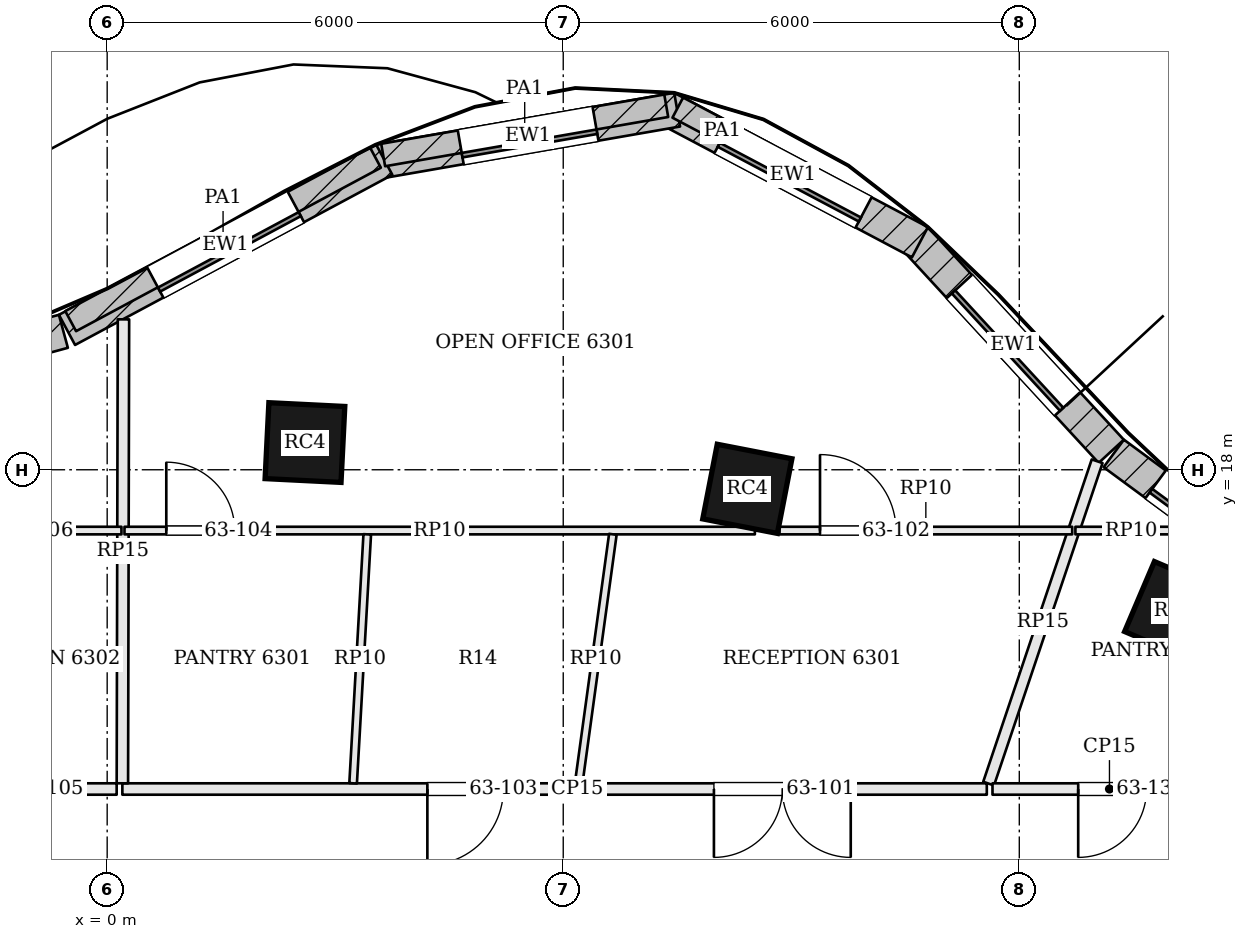
"""IFC4 building model, lengths in metres.
Left out: names, types, materials, properties, quantities, classifications, styles, units other than length and angle.
Written with IfcOpenShell. Run it as: python <this file> out.ifc"""

import sys

from ifc_helpers import new_model, si_unit, direction, frame, frame_2d, origin, origin_2d, place, context, subcontext, project, spatial, rectangle, extrude, element, fill, save


model = new_model("IFC4")
c1 = context("Model", 3, precision=1e-05, world=origin(), true_north=direction((0.0, 1.0)))
c2 = subcontext(c1, "Body", "Model", "MODEL_VIEW")
j1 = project(units=[si_unit("LENGTHUNIT", "METRE"), si_unit("PLANEANGLEUNIT", "RADIAN")], contexts=[c1])
p1 = place(None, origin())
s1 = spatial("IfcSite", under=j1, at=p1, CompositionType="ELEMENT")
p2 = place(p1, origin())
s2 = spatial("IfcBuilding", under=s1, at=p2, CompositionType="ELEMENT")
p3 = place(p2, frame((0.0, 0.0, 256.5)))
s3 = spatial("IfcBuildingStorey", under=s2, at=p3, CompositionType="ELEMENT", Elevation=256.5)
for number, where, z_axis, x_axis in (
    (1, (14.042, 16.136, 0.0), (0.0, 0.0, 1.0), (-0.92, 0.392, 0.0)),
    (2, (8.422, 17.749, 0.0), (0.0, 0.0, 1.0), (-0.982, 0.191, 0.0)),
    (3, (2.602, 18.358, 0.0), (0.0, 0.0, 1.0), (-0.999, 0.05, 0.0)),
):
    element("IfcColumn", number, at=place(p3, frame(where, z_axis=z_axis, x_axis=x_axis)), inside=s3, PredefinedType="COLUMN", context=c2, shape_type="SweptSolid", body=[
        extrude(rectangle(XDim=1.0, YDim=1.0, at=origin_2d()), origin(), (0.0, 0.0, 1.0), 3.9),
    ])
p4 = place(p3, frame((16.036, 16.158, 0.0), z_axis=(0.0, 0.0, 1.0), x_axis=(-0.805181432967, 0.593028549064, 0.0)))
e4 = element("IfcWall", 4, at=p4, inside=s3, PredefinedType="SOLIDWALL", context=c2, shape_type="SweptSolid", body=[
    extrude(rectangle(XDim=3.469, YDim=0.45, at=frame_2d((1.734, 0.0))), origin(), (0.0, 0.0, 1.0), 3.7),
])
p5 = place(p4, frame((0.684, 0.0, 0.9)))
e5 = element("IfcOpeningElement", 5, at=p5, cuts=e4, PredefinedType="OPENING", context=c2, shape_type="SweptSolid", body=[
    extrude(rectangle(XDim=2.1, YDim=2.3, at=frame_2d((1.05, 1.15))), frame((0.0, 0.235, 0.0), z_axis=(0.0, -1.0, 0.0), x_axis=(1.0, 0.0, 0.0)), (0.0, 0.0, 1.0), 0.47),
])
p6 = place(p3, frame((13.209, 18.243, 0.0), z_axis=(0.0, 0.0, 1.0), x_axis=(-0.677612152497, 0.735419452278, 0.0)))
e6 = element("IfcWall", 6, at=p6, inside=s3, PredefinedType="SOLIDWALL", context=c2, shape_type="SweptSolid", body=[
    extrude(rectangle(XDim=3.797, YDim=0.45, at=frame_2d((1.898, 0.0))), origin(), (0.0, 0.0, 1.0), 3.7),
])
p7 = place(p6, frame((0.848, 0.0, 0.9)))
e7 = element("IfcOpeningElement", 7, at=p7, cuts=e6, PredefinedType="OPENING", context=c2, shape_type="SweptSolid", body=[
    extrude(rectangle(XDim=2.1, YDim=2.3, at=frame_2d((1.05, 1.15))), frame((0.0, 0.235, 0.0), z_axis=(0.0, -1.0, 0.0), x_axis=(1.0, 0.0, 0.0)), (0.0, 0.0, 1.0), 0.47),
])
p8 = place(p3, frame((10.693, 20.993, 0.0), z_axis=(0.0, 0.0, 1.0), x_axis=(-0.883817790726, 0.46783128668, 0.0)))
e8 = element("IfcWall", 8, at=p8, inside=s3, PredefinedType="SOLIDWALL", context=c2, shape_type="SweptSolid", body=[
    extrude(rectangle(XDim=3.777, YDim=0.45, at=frame_2d((1.888, 0.0))), origin(), (0.0, 0.0, 1.0), 3.7),
])
p9 = place(p8, frame((0.838, 0.0, 0.9)))
e9 = element("IfcOpeningElement", 9, at=p9, cuts=e8, PredefinedType="OPENING", context=c2, shape_type="SweptSolid", body=[
    extrude(rectangle(XDim=2.1, YDim=2.3, at=frame_2d((1.05, 1.15))), frame((0.0, 0.235, 0.0), z_axis=(0.0, -1.0, 0.0), x_axis=(1.0, 0.0, 0.0)), (0.0, 0.0, 1.0), 0.47),
])
p10 = place(p3, frame((7.499, 22.737, 0.0), z_axis=(0.0, 0.0, 1.0), x_axis=(-0.98521220506, -0.171338585849, 0.0)))
e10 = element("IfcWall", 10, at=p10, inside=s3, PredefinedType="SOLIDWALL", context=c2, shape_type="SweptSolid", body=[
    extrude(rectangle(XDim=3.98, YDim=0.45, at=frame_2d((1.99, 0.0))), origin(), (0.0, 0.0, 1.0), 3.7),
])
p11 = place(p10, frame((1.09, 0.0, 0.9)))
e11 = element("IfcOpeningElement", 11, at=p11, cuts=e10, PredefinedType="OPENING", context=c2, shape_type="SweptSolid", body=[
    extrude(rectangle(XDim=1.8, YDim=2.3, at=frame_2d((0.9, 1.15))), frame((0.0, 0.235, 0.0), z_axis=(0.0, -1.0, 0.0), x_axis=(1.0, 0.0, 0.0)), (0.0, 0.0, 1.0), 0.47),
])
p12 = place(p3, frame((3.646, 22.079, 0.0), z_axis=(0.0, 0.0, 1.0), x_axis=(-0.881279133897, -0.472596115259, 0.0)))
e12 = element("IfcWall", 12, at=p12, inside=s3, PredefinedType="SOLIDWALL", context=c2, shape_type="SweptSolid", body=[
    extrude(rectangle(XDim=4.737, YDim=0.45, at=frame_2d((2.368, 0.0))), origin(), (0.0, 0.0, 1.0), 3.7),
])
p13 = place(p12, frame((1.318, 0.0, 0.9)))
e13 = element("IfcOpeningElement", 13, at=p13, cuts=e12, PredefinedType="OPENING", context=c2, shape_type="SweptSolid", body=[
    extrude(rectangle(XDim=2.1, YDim=2.3, at=frame_2d((1.05, 1.15))), frame((0.0, 0.235, 0.0), z_axis=(0.0, -1.0, 0.0), x_axis=(1.0, 0.0, 0.0)), (0.0, 0.0, 1.0), 0.47),
])
p14 = place(p3, frame((-0.576, 19.821, 0.0), z_axis=(0.0, 0.0, 1.0), x_axis=(-0.965009398019, -0.262215296532, 0.0)))
e14 = element("IfcWall", 14, at=p14, inside=s3, PredefinedType="SOLIDWALL", context=c2, shape_type="SweptSolid", body=[
    extrude(rectangle(XDim=2.565, YDim=0.45, at=frame_2d((1.283, 0.0))), origin(), (0.0, 0.0, 1.0), 3.7),
])
p15 = place(p14, frame((0.233, 0.0, 0.9)))
e15 = element("IfcOpeningElement", 15, at=p15, cuts=e14, PredefinedType="OPENING", context=c2, shape_type="SweptSolid", body=[
    extrude(rectangle(XDim=2.1, YDim=2.3, at=frame_2d((1.05, 1.15))), frame((0.0, 0.235, 0.0), z_axis=(0.0, -1.0, 0.0), x_axis=(1.0, 0.0, 0.0)), (0.0, 0.0, 1.0), 0.47),
])
p16 = place(p3, frame((8.682, 22.143, 3.9), z_axis=(0.0, 0.0, 1.0), x_axis=(-0.883787916347, 0.467887720419, 0.0)))
e16 = element("IfcWall", 16, at=p16, inside=s3, PredefinedType="PARAPET", context=c2, shape_type="SweptSolid", body=[
    extrude(rectangle(XDim=1.329, YDim=0.3, at=frame_2d((0.665, 0.0))), origin(), (0.0, 0.0, 1.0), 1.1),
])
p17 = place(p3, frame((7.355, 22.789, 3.9), z_axis=(0.0, 0.0, 1.0), x_axis=(-0.985197529684, -0.171422949176, 0.0)))
e17 = element("IfcWall", 17, at=p17, inside=s3, PredefinedType="PARAPET", context=c2, shape_type="SweptSolid", body=[
    extrude(rectangle(XDim=3.78, YDim=0.3, at=frame_2d((1.89, 0.0))), origin(), (0.0, 0.0, 1.0), 1.1),
])
p18 = place(p3, frame((3.53, 22.106, 3.9), z_axis=(0.0, 0.0, 1.0), x_axis=(-0.881258931682, -0.472633785643, 0.0)))
e18 = element("IfcWall", 18, at=p18, inside=s3, PredefinedType="PARAPET", context=c2, shape_type="SweptSolid", body=[
    extrude(rectangle(XDim=4.55, YDim=0.3, at=frame_2d((2.275, 0.0))), origin(), (0.0, 0.0, 1.0), 1.1),
])
p19 = place(p3, frame((11.573, 13.8, 0.0), z_axis=(0.0, 0.0, 1.0), x_axis=(-1.0, 0.0, 0.0)))
e19 = element("IfcWall", 19, at=p19, inside=s3, PredefinedType="PARTITIONING", context=c2, shape_type="SweptSolid", body=[
    extrude(rectangle(XDim=11.373, YDim=0.15, at=frame_2d((5.687, 0.0))), origin(), (0.0, 0.0, 1.0), 3.084),
])
p20 = place(p19, frame((1.79, 0.0, 0.0)))
e20 = element("IfcOpeningElement", 20, at=p20, cuts=e19, PredefinedType="OPENING", context=c2, shape_type="SweptSolid", body=[
    extrude(rectangle(XDim=1.8, YDim=2.1, at=frame_2d((0.9, 1.05))), frame((0.0, 0.085, 0.0), z_axis=(0.0, -1.0, 0.0), x_axis=(1.0, 0.0, 0.0)), (0.0, 0.0, 1.0), 0.17),
])
p21 = place(p19, frame((6.36, 0.0, 0.0)))
e21 = element("IfcOpeningElement", 21, at=p21, cuts=e19, PredefinedType="OPENING", context=c2, shape_type="SweptSolid", body=[
    extrude(rectangle(XDim=1.0, YDim=2.4, at=frame_2d((0.5, 1.2))), frame((0.0, 0.085, 0.0), z_axis=(0.0, -1.0, 0.0), x_axis=(1.0, 0.0, 0.0)), (0.0, 0.0, 1.0), 0.17),
])
p22 = place(p3, frame((13.024, 18.112, 0.0), z_axis=(0.0, 0.0, 1.0), x_axis=(-0.319057942095, -0.947735210692, 0.0)))
e22 = element("IfcWall", 22, at=p22, inside=s3, PredefinedType="PARTITIONING", context=c2, shape_type="SweptSolid", body=[
    extrude(rectangle(XDim=4.475, YDim=0.15, at=frame_2d((2.237, 0.0))), origin(), (0.0, 0.0, 1.0), 3.084),
])
p23 = place(p3, frame((0.214, 19.979, 0.0), z_axis=(0.0, 0.0, 1.0), x_axis=(-0.002359899032, -0.999997215434, 0.0)))
e23 = element("IfcWall", 23, at=p23, inside=s3, PredefinedType="PARTITIONING", context=c2, shape_type="SweptSolid", body=[
    extrude(rectangle(XDim=6.104, YDim=0.15, at=frame_2d((3.052, 0.0))), origin(), (0.0, 0.0, 1.0), 3.084),
])
p24 = place(p3, frame((0.125, 13.8, 0.0), z_axis=(0.0, 0.0, 1.0), x_axis=(-1.0, 0.0, 0.0)))
e24 = element("IfcWall", 24, at=p24, inside=s3, PredefinedType="PARTITIONING", context=c2, shape_type="SweptSolid", body=[
    extrude(rectangle(XDim=12.469, YDim=0.15, at=frame_2d((6.235, 0.0))), origin(), (0.0, 0.0, 1.0), 3.084),
])
p25 = place(p24, frame((0.883, 0.0, 0.0)))
e25 = element("IfcOpeningElement", 25, at=p25, cuts=e24, PredefinedType="OPENING", context=c2, shape_type="SweptSolid", body=[
    extrude(rectangle(XDim=1.0, YDim=2.1, at=frame_2d((0.5, 1.05))), frame((0.0, 0.085, 0.0), z_axis=(0.0, -1.0, 0.0), x_axis=(1.0, 0.0, 0.0)), (0.0, 0.0, 1.0), 0.17),
])
p26 = place(p24, frame((3.987, 0.0, 0.0)))
e26 = element("IfcOpeningElement", 26, at=p26, cuts=e24, PredefinedType="OPENING", context=c2, shape_type="SweptSolid", body=[
    extrude(rectangle(XDim=1.0, YDim=2.4, at=frame_2d((0.5, 1.2))), frame((0.0, 0.085, 0.0), z_axis=(0.0, -1.0, 0.0), x_axis=(1.0, 0.0, 0.0)), (0.0, 0.0, 1.0), 0.17),
])
p27 = place(p3, frame((14.725, 13.8, 0.0), z_axis=(0.0, 0.0, 1.0), x_axis=(-1.0, 0.0, 0.0)))
e27 = element("IfcWall", 27, at=p27, inside=s3, PredefinedType="PARTITIONING", context=c2, shape_type="SweptSolid", body=[
    extrude(rectangle(XDim=3.078, YDim=0.15, at=frame_2d((1.539, 0.0))), origin(), (0.0, 0.0, 1.0), 3.084),
])
p28 = place(p27, frame((1.05, 0.0, 0.0)))
e28 = element("IfcOpeningElement", 28, at=p28, cuts=e27, PredefinedType="OPENING", context=c2, shape_type="SweptSolid", body=[
    extrude(rectangle(XDim=0.9, YDim=2.1, at=frame_2d((0.45, 1.05))), frame((0.0, 0.085, 0.0), z_axis=(0.0, -1.0, 0.0), x_axis=(1.0, 0.0, 0.0)), (0.0, 0.0, 1.0), 0.17),
])
p29 = place(p3, frame((0.228, 17.2, 0.0), z_axis=(0.0, 0.0, 1.0), x_axis=(1.0, 0.0, 0.0)))
e29 = element("IfcWall", 29, at=p29, inside=s3, PredefinedType="PARTITIONING", context=c2, shape_type="SweptSolid", body=[
    extrude(rectangle(XDim=8.293, YDim=0.1, at=frame_2d((4.147, 0.0))), origin(), (0.0, 0.0, 1.0), 3.084),
])
p30 = place(p29, frame((0.55, 0.0, 0.0)))
e30 = element("IfcOpeningElement", 30, at=p30, cuts=e29, PredefinedType="OPENING", context=c2, shape_type="SweptSolid", body=[
    extrude(rectangle(XDim=0.9, YDim=2.1, at=frame_2d((0.45, 1.05))), frame((0.0, 0.06, 0.0), z_axis=(0.0, -1.0, 0.0), x_axis=(1.0, 0.0, 0.0)), (0.0, 0.0, 1.0), 0.12),
])
p31 = place(p3, frame((8.845, 17.2, 0.0), z_axis=(0.0, 0.0, 1.0), x_axis=(1.0, 0.0, 0.0)))
e31 = element("IfcWall", 31, at=p31, inside=s3, PredefinedType="PARTITIONING", context=c2, shape_type="SweptSolid", body=[
    extrude(rectangle(XDim=3.851, YDim=0.1, at=frame_2d((1.925, 0.0))), origin(), (0.0, 0.0, 1.0), 3.084),
])
p32 = place(p31, frame((0.533, 0.0, 0.0)))
e32 = element("IfcOpeningElement", 32, at=p32, cuts=e31, PredefinedType="OPENING", context=c2, shape_type="SweptSolid", body=[
    extrude(rectangle(XDim=1.0, YDim=2.1, at=frame_2d((0.5, 1.05))), frame((0.0, 0.06, 0.0), z_axis=(0.0, -1.0, 0.0), x_axis=(1.0, 0.0, 0.0)), (0.0, 0.0, 1.0), 0.12),
])
p33 = place(p3, frame((6.203, 13.874, 0.0), z_axis=(0.0, 0.0, 1.0), x_axis=(0.135920343856, 0.990719768717, 0.0)))
e33 = element("IfcWall", 33, at=p33, inside=s3, PredefinedType="PARTITIONING", context=c2, shape_type="SweptSolid", body=[
    extrude(rectangle(XDim=3.307, YDim=0.1, at=frame_2d((1.653, 0.0))), origin(), (0.0, 0.0, 1.0), 3.084),
])
p34 = place(p3, frame((3.236, 13.875, 0.0), z_axis=(0.0, 0.0, 1.0), x_axis=(0.056636488477, 0.998394865859, 0.0)))
e34 = element("IfcWall", 34, at=p34, inside=s3, PredefinedType="PARTITIONING", context=c2, shape_type="SweptSolid", body=[
    extrude(rectangle(XDim=3.281, YDim=0.1, at=frame_2d((1.64, 0.0))), origin(), (0.0, 0.0, 1.0), 3.084),
])
p35 = place(p3, frame((-8.566, 17.2, 0.0), z_axis=(0.0, 0.0, 1.0), x_axis=(1.0, 0.0, 0.0)))
e35 = element("IfcWall", 35, at=p35, inside=s3, PredefinedType="PARTITIONING", context=c2, shape_type="SweptSolid", body=[
    extrude(rectangle(XDim=8.754, YDim=0.1, at=frame_2d((4.377, 0.0))), origin(), (0.0, 0.0, 1.0), 3.084),
])
p36 = place(p35, frame((6.674, 0.0, 0.0)))
e36 = element("IfcOpeningElement", 36, at=p36, cuts=e35, PredefinedType="OPENING", context=c2, shape_type="SweptSolid", body=[
    extrude(rectangle(XDim=1.0, YDim=2.1, at=frame_2d((0.5, 1.05))), frame((0.0, 0.06, 0.0), z_axis=(0.0, -1.0, 0.0), x_axis=(1.0, 0.0, 0.0)), (0.0, 0.0, 1.0), 0.12),
])
p37 = place(p35, frame((0.454, 0.0, 0.0)))
e37 = element("IfcOpeningElement", 37, at=p37, cuts=e35, PredefinedType="OPENING", context=c2, shape_type="SweptSolid", body=[
    extrude(rectangle(XDim=0.9, YDim=2.1, at=frame_2d((0.45, 1.05))), frame((0.0, 0.06, 0.0), z_axis=(0.0, -1.0, 0.0), x_axis=(1.0, 0.0, 0.0)), (0.0, 0.0, 1.0), 0.12),
])
p38 = place(p3, frame((12.738, 17.2, 0.0), z_axis=(0.0, 0.0, 1.0), x_axis=(1.0, 0.0, 0.0)))
e38 = element("IfcWall", 38, at=p38, inside=s3, PredefinedType="PARTITIONING", context=c2, shape_type="SweptSolid", body=[
    extrude(rectangle(XDim=1.469, YDim=0.1, at=frame_2d((0.735, 0.0))), origin(), (0.0, 0.0, 1.0), 3.084),
])
p39 = place(p5, origin())
e39 = element("IfcWindow", 39, at=p39, inside=s3, PartitioningType="SINGLE_PANEL", PredefinedType="WINDOW", context=c2, shape_type="SweptSolid", body=[
    extrude(rectangle(XDim=2.1, YDim=2.3, at=frame_2d((1.05, 1.15))), frame((0.0, 0.135, 0.0), z_axis=(0.0, -1.0, 0.0), x_axis=(1.0, 0.0, 0.0)), (0.0, 0.0, 1.0), 0.06),
])
fill(e5, e39)
p40 = place(p7, origin())
e40 = element("IfcWindow", 40, at=p40, inside=s3, PartitioningType="SINGLE_PANEL", PredefinedType="WINDOW", context=c2, shape_type="SweptSolid", body=[
    extrude(rectangle(XDim=2.1, YDim=2.3, at=frame_2d((1.05, 1.15))), frame((0.0, 0.135, 0.0), z_axis=(0.0, -1.0, 0.0), x_axis=(1.0, 0.0, 0.0)), (0.0, 0.0, 1.0), 0.06),
])
fill(e7, e40)
p41 = place(p9, origin())
e41 = element("IfcWindow", 41, at=p41, inside=s3, PartitioningType="SINGLE_PANEL", PredefinedType="WINDOW", context=c2, shape_type="SweptSolid", body=[
    extrude(rectangle(XDim=2.1, YDim=2.3, at=frame_2d((1.05, 1.15))), frame((0.0, 0.135, 0.0), z_axis=(0.0, -1.0, 0.0), x_axis=(1.0, 0.0, 0.0)), (0.0, 0.0, 1.0), 0.06),
])
fill(e9, e41)
p42 = place(p11, origin())
e42 = element("IfcWindow", 42, at=p42, inside=s3, PartitioningType="SINGLE_PANEL", PredefinedType="WINDOW", context=c2, shape_type="SweptSolid", body=[
    extrude(rectangle(XDim=1.8, YDim=2.3, at=frame_2d((0.9, 1.15))), frame((0.0, 0.135, 0.0), z_axis=(0.0, -1.0, 0.0), x_axis=(1.0, 0.0, 0.0)), (0.0, 0.0, 1.0), 0.06),
])
fill(e11, e42)
p43 = place(p13, origin())
e43 = element("IfcWindow", 43, at=p43, inside=s3, PartitioningType="SINGLE_PANEL", PredefinedType="WINDOW", context=c2, shape_type="SweptSolid", body=[
    extrude(rectangle(XDim=2.1, YDim=2.3, at=frame_2d((1.05, 1.15))), frame((0.0, 0.135, 0.0), z_axis=(0.0, -1.0, 0.0), x_axis=(1.0, 0.0, 0.0)), (0.0, 0.0, 1.0), 0.06),
])
fill(e13, e43)
p44 = place(p20, origin())
e44 = element("IfcDoor", 44, at=p44, inside=s3, OperationType="DOUBLE_DOOR_SINGLE_SWING", PredefinedType="DOOR", context=c2, shape_type="SweptSolid", body=[
    extrude(rectangle(XDim=1.8, YDim=2.1, at=frame_2d((0.9, 1.05))), frame((0.0, 0.025, 0.0), z_axis=(0.0, -1.0, 0.0), x_axis=(1.0, 0.0, 0.0)), (0.0, 0.0, 1.0), 0.05),
])
fill(e20, e44)
p45 = place(p32, origin())
e45 = element("IfcDoor", 45, at=p45, inside=s3, OperationType="SINGLE_SWING_LEFT", PredefinedType="DOOR", context=c2, shape_type="SweptSolid", body=[
    extrude(rectangle(XDim=1.0, YDim=2.1, at=frame_2d((0.5, 1.05))), frame((0.0, 0.025, 0.0), z_axis=(0.0, -1.0, 0.0), x_axis=(1.0, 0.0, 0.0)), (0.0, 0.0, 1.0), 0.05),
])
fill(e32, e45)
p46 = place(p21, origin())
e46 = element("IfcDoor", 46, at=p46, inside=s3, OperationType="SINGLE_SWING_RIGHT", PredefinedType="DOOR", context=c2, shape_type="SweptSolid", body=[
    extrude(rectangle(XDim=1.0, YDim=2.4, at=frame_2d((0.5, 1.2))), frame((0.0, 0.025, 0.0), z_axis=(0.0, -1.0, 0.0), x_axis=(1.0, 0.0, 0.0)), (0.0, 0.0, 1.0), 0.05),
])
fill(e21, e46)
p47 = place(p30, origin())
e47 = element("IfcDoor", 47, at=p47, inside=s3, OperationType="SINGLE_SWING_LEFT", PredefinedType="DOOR", context=c2, shape_type="SweptSolid", body=[
    extrude(rectangle(XDim=0.9, YDim=2.1, at=frame_2d((0.45, 1.05))), frame((0.0, 0.025, 0.0), z_axis=(0.0, -1.0, 0.0), x_axis=(1.0, 0.0, 0.0)), (0.0, 0.0, 1.0), 0.05),
])
fill(e30, e47)
p48 = place(p28, origin())
e48 = element("IfcDoor", 48, at=p48, inside=s3, OperationType="SINGLE_SWING_RIGHT", PredefinedType="DOOR", context=c2, shape_type="SweptSolid", body=[
    extrude(rectangle(XDim=0.9, YDim=2.1, at=frame_2d((0.45, 1.05))), frame((0.0, 0.025, 0.0), z_axis=(0.0, -1.0, 0.0), x_axis=(1.0, 0.0, 0.0)), (0.0, 0.0, 1.0), 0.05),
])
fill(e28, e48)
save(model, sys.argv[1])
